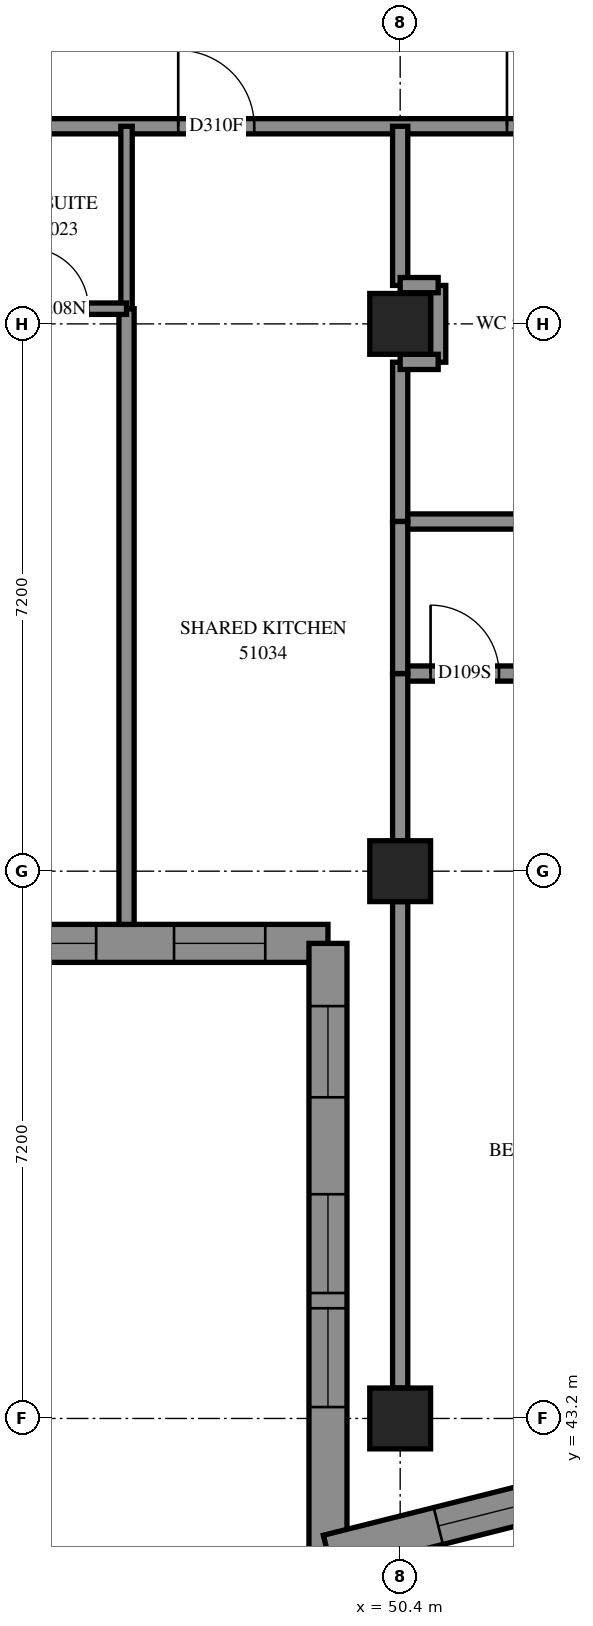
"""IFC4 building model, lengths in metres.
Left out: names, types, materials, properties, quantities, classifications, styles, units other than length and angle.
Written with IfcOpenShell. Run it as: python <this file> out.ifc"""

import sys

from ifc_helpers import new_model, si_unit, direction, frame, frame_2d, origin, origin_2d, place, context, subcontext, project, spatial, polyline, rectangle, outline, extrude, element, fill, save


model = new_model("IFC4")
c1 = context("Model", 3, precision=1e-05, world=origin(), true_north=direction((0.0, 1.0)))
c2 = subcontext(c1, "Body", "Model", "MODEL_VIEW")
j1 = project(units=[si_unit("LENGTHUNIT", "METRE"), si_unit("PLANEANGLEUNIT", "RADIAN")], contexts=[c1])
p1 = place(None, origin())
s1 = spatial("IfcSite", under=j1, at=p1, CompositionType="ELEMENT")
p2 = place(p1, origin())
s2 = spatial("IfcBuilding", under=s1, at=p2, CompositionType="ELEMENT")
p3 = place(p2, frame((0.0, 0.0, 189.6)))
s3 = spatial("IfcBuildingStorey", under=s2, at=p3, CompositionType="ELEMENT", Elevation=189.6)
for number, where, z_axis, x_axis in (
    (1, (50.4, 43.2, 0.0), (0.0, 0.0, 1.0), (1.0, 0.0, 0.0)),
    (2, (50.4, 50.4, 0.0), (0.0, 0.0, 1.0), (1.0, 0.0, 0.0)),
    (3, (50.4, 57.6, 0.0), (0.0, 0.0, 1.0), (1.0, 0.0, 0.0)),
):
    element("IfcColumn", number, at=place(p3, frame(where, z_axis=z_axis, x_axis=x_axis)), inside=s3, PredefinedType="COLUMN", context=c2, shape_type="SweptSolid", body=[
        extrude(rectangle(XDim=0.8, YDim=0.8, at=origin_2d()), origin(), (0.0, 0.0, 1.0), 3.1),
    ])
p4 = place(p3, frame((42.25, 49.45, 0.0), z_axis=(0.0, 0.0, 1.0), x_axis=(1.0, 0.0, 0.0)))
e4 = element("IfcWall", 4, at=p4, inside=s3, PredefinedType="SOLIDWALL", context=c2, shape_type="SweptSolid", body=[
    extrude(outline(polyline([(-0.25, -0.25), (6.95, -0.25), (7.45, 0.25), (0.25, 0.25), (-0.25, -0.25)])), origin(), (0.0, 0.0, 1.0), 3.1),
])
p5 = place(p4, frame((1.35, 0.0, 0.45)))
e5 = element("IfcOpeningElement", 5, at=p5, cuts=e4, PredefinedType="OPENING", context=c2, shape_type="SweptSolid", body=[
    extrude(rectangle(XDim=1.3, YDim=2.5, at=frame_2d((0.65, 1.25))), frame((0.0, 0.26, 0.0), z_axis=(0.0, -1.0, 0.0), x_axis=(1.0, 0.0, 0.0)), (0.0, 0.0, 1.0), 0.52),
])
p6 = place(p4, frame((2.85, 0.0, 0.45)))
e6 = element("IfcOpeningElement", 6, at=p6, cuts=e4, PredefinedType="OPENING", context=c2, shape_type="SweptSolid", body=[
    extrude(rectangle(XDim=1.3, YDim=2.5, at=frame_2d((0.65, 1.25))), frame((0.0, 0.26, 0.0), z_axis=(0.0, -1.0, 0.0), x_axis=(1.0, 0.0, 0.0)), (0.0, 0.0, 1.0), 0.52),
])
p7 = place(p4, frame((5.175, 0.0, 0.45)))
e7 = element("IfcOpeningElement", 7, at=p7, cuts=e4, PredefinedType="OPENING", context=c2, shape_type="SweptSolid", body=[
    extrude(rectangle(XDim=1.2, YDim=2.5, at=frame_2d((0.6, 1.25))), frame((0.0, 0.26, 0.0), z_axis=(0.0, -1.0, 0.0), x_axis=(1.0, 0.0, 0.0)), (0.0, 0.0, 1.0), 0.52),
])
p8 = place(p3, frame((49.45, 49.45, 0.0), z_axis=(0.0, 0.0, 1.0), x_axis=(0.0, -1.0, 0.0)))
e8 = element("IfcWall", 8, at=p8, inside=s3, PredefinedType="SOLIDWALL", context=c2, shape_type="SweptSolid", body=[
    extrude(outline(polyline([(0.25, -0.25), (8.35, -0.25), (7.709, 0.25), (-0.25, 0.25), (0.25, -0.25)])), origin(), (0.0, 0.0, 1.0), 3.1),
])
p9 = place(p8, frame((3.3, 0.0, 0.45)))
e9 = element("IfcOpeningElement", 9, at=p9, cuts=e8, PredefinedType="OPENING", context=c2, shape_type="SweptSolid", body=[
    extrude(rectangle(XDim=1.3, YDim=2.5, at=frame_2d((0.65, 1.25))), frame((0.0, 0.26, 0.0), z_axis=(0.0, -1.0, 0.0), x_axis=(1.0, 0.0, 0.0)), (0.0, 0.0, 1.0), 0.52),
])
p10 = place(p8, frame((4.8, 0.0, 0.45)))
e10 = element("IfcOpeningElement", 10, at=p10, cuts=e8, PredefinedType="OPENING", context=c2, shape_type="SweptSolid", body=[
    extrude(rectangle(XDim=1.3, YDim=2.5, at=frame_2d((0.65, 1.25))), frame((0.0, 0.26, 0.0), z_axis=(0.0, -1.0, 0.0), x_axis=(1.0, 0.0, 0.0)), (0.0, 0.0, 1.0), 0.52),
])
p11 = place(p8, frame((0.825, 0.0, 0.45)))
e11 = element("IfcOpeningElement", 11, at=p11, cuts=e8, PredefinedType="OPENING", context=c2, shape_type="SweptSolid", body=[
    extrude(rectangle(XDim=1.2, YDim=2.5, at=frame_2d((0.6, 1.25))), frame((0.0, 0.26, 0.0), z_axis=(0.0, -1.0, 0.0), x_axis=(1.0, 0.0, 0.0)), (0.0, 0.0, 1.0), 0.52),
])
p12 = place(p3, frame((49.45, 41.421, 0.0), z_axis=(0.0, 0.0, 1.0), x_axis=(0.9698558331, 0.2436794266, 0.0)))
e12 = element("IfcWall", 12, at=p12, inside=s3, PredefinedType="SOLIDWALL", context=c2, shape_type="SweptSolid", body=[
    extrude(outline(polyline([(-0.321, -0.25), (3.373, -0.25), (3.456, 0.25), (0.321, 0.25), (-0.321, -0.25)])), origin(), (0.0, 0.0, 1.0), 3.1),
])
p13 = place(p12, frame((1.497, 0.0, 0.45)))
e13 = element("IfcOpeningElement", 13, at=p13, cuts=e12, PredefinedType="OPENING", context=c2, shape_type="SweptSolid", body=[
    extrude(rectangle(XDim=1.2, YDim=2.5, at=frame_2d((0.6, 1.25))), frame((0.0, 0.26, 0.0), z_axis=(0.0, -1.0, 0.0), x_axis=(1.0, 0.0, 0.0)), (0.0, 0.0, 1.0), 0.52),
])
p14 = place(p3, frame((36.0, 60.2, 0.0), z_axis=(0.0, 0.0, 1.0), x_axis=(1.0, 0.0, 0.0)))
e14 = element("IfcWall", 14, at=p14, inside=s3, PredefinedType="PARTITIONING", context=c2, shape_type="SweptSolid", body=[
    extrude(rectangle(XDim=17.0, YDim=0.2, at=frame_2d((8.5, 0.0))), origin(), (0.0, 0.0, 1.0), 3.1),
])
p15 = place(p14, frame((4.125, 0.0, 0.0)))
e15 = element("IfcOpeningElement", 15, at=p15, cuts=e14, PredefinedType="OPENING", context=c2, shape_type="SweptSolid", body=[
    extrude(rectangle(XDim=1.0, YDim=2.1, at=frame_2d((0.5, 1.05))), frame((0.0, 0.11, 0.0), z_axis=(0.0, -1.0, 0.0), x_axis=(1.0, 0.0, 0.0)), (0.0, 0.0, 1.0), 0.22),
])
p16 = place(p14, frame((7.6, 0.0, 0.0)))
e16 = element("IfcOpeningElement", 16, at=p16, cuts=e14, PredefinedType="OPENING", context=c2, shape_type="SweptSolid", body=[
    extrude(rectangle(XDim=0.9, YDim=2.1, at=frame_2d((0.45, 1.05))), frame((0.0, 0.11, 0.0), z_axis=(0.0, -1.0, 0.0), x_axis=(1.0, 0.0, 0.0)), (0.0, 0.0, 1.0), 0.22),
])
p17 = place(p14, frame((11.48, 0.0, 0.0)))
e17 = element("IfcOpeningElement", 17, at=p17, cuts=e14, PredefinedType="OPENING", context=c2, shape_type="SweptSolid", body=[
    extrude(rectangle(XDim=1.0, YDim=2.1, at=frame_2d((0.5, 1.05))), frame((0.0, 0.11, 0.0), z_axis=(0.0, -1.0, 0.0), x_axis=(1.0, 0.0, 0.0)), (0.0, 0.0, 1.0), 0.22),
])
p18 = place(p14, frame((15.805, 0.0, 0.0)))
e18 = element("IfcOpeningElement", 18, at=p18, cuts=e14, PredefinedType="OPENING", context=c2, shape_type="SweptSolid", body=[
    extrude(rectangle(XDim=1.0, YDim=2.1, at=frame_2d((0.5, 1.05))), frame((0.0, 0.11, 0.0), z_axis=(0.0, -1.0, 0.0), x_axis=(1.0, 0.0, 0.0)), (0.0, 0.0, 1.0), 0.22),
])
p19 = place(p3, frame((46.8, 49.7, 0.0), z_axis=(0.0, 0.0, 1.0), x_axis=(0.0, 1.0, 0.0)))
e19 = element("IfcWall", 19, at=p19, inside=s3, PredefinedType="PARTITIONING", context=c2, shape_type="SweptSolid", body=[
    extrude(rectangle(XDim=8.1, YDim=0.2, at=frame_2d((4.05, 0.0))), origin(), (0.0, 0.0, 1.0), 3.1),
])
p20 = place(p3, frame((50.4, 43.6, 0.0), z_axis=(0.0, 0.0, 1.0), x_axis=(0.0, 1.0, 0.0)))
e20 = element("IfcWall", 20, at=p20, inside=s3, PredefinedType="PARTITIONING", context=c2, shape_type="SweptSolid", body=[
    extrude(rectangle(XDim=6.4, YDim=0.2, at=frame_2d((3.2, 0.0))), origin(), (0.0, 0.0, 1.0), 2.6),
])
p21 = place(p3, frame((50.4, 53.0, 0.0), z_axis=(0.0, 0.0, 1.0), x_axis=(1.0, 0.0, 0.0)))
e21 = element("IfcWall", 21, at=p21, inside=s3, PredefinedType="PARTITIONING", context=c2, shape_type="SweptSolid", body=[
    extrude(rectangle(XDim=5.2, YDim=0.2, at=frame_2d((2.6, 0.0))), origin(), (0.0, 0.0, 1.0), 3.1),
])
p22 = place(p21, frame((0.4, 0.0, 0.0)))
e22 = element("IfcOpeningElement", 22, at=p22, cuts=e21, PredefinedType="OPENING", context=c2, shape_type="SweptSolid", body=[
    extrude(rectangle(XDim=0.9, YDim=2.1, at=frame_2d((0.45, 1.05))), frame((0.0, 0.11, 0.0), z_axis=(0.0, -1.0, 0.0), x_axis=(1.0, 0.0, 0.0)), (0.0, 0.0, 1.0), 0.22),
])
p23 = place(p21, frame((3.946, 0.0, 0.0)))
e23 = element("IfcOpeningElement", 23, at=p23, cuts=e21, PredefinedType="OPENING", context=c2, shape_type="SweptSolid", body=[
    extrude(rectangle(XDim=1.0, YDim=2.1, at=frame_2d((0.5, 1.05))), frame((0.0, 0.11, 0.0), z_axis=(0.0, -1.0, 0.0), x_axis=(1.0, 0.0, 0.0)), (0.0, 0.0, 1.0), 0.22),
])
p24 = place(p3, frame((50.4, 55.0, 0.0), z_axis=(0.0, 0.0, 1.0), x_axis=(1.0, 0.0, 0.0)))
e24 = element("IfcWall", 24, at=p24, inside=s3, PredefinedType="PARTITIONING", context=c2, shape_type="SweptSolid", body=[
    extrude(rectangle(XDim=2.6, YDim=0.2, at=frame_2d((1.3, 0.0))), origin(), (0.0, 0.0, 1.0), 3.1),
])
p25 = place(p3, frame((46.8, 57.8, 0.0), z_axis=(0.0, 0.0, 1.0), x_axis=(0.0, 1.0, 0.0)))
e25 = element("IfcWall", 25, at=p25, inside=s3, PredefinedType="PARTITIONING", context=c2, shape_type="SweptSolid", body=[
    extrude(rectangle(XDim=2.4, YDim=0.15, at=frame_2d((1.2, 0.0))), origin(), (0.0, 0.0, 1.0), 3.1),
])
p26 = place(p3, frame((50.4, 50.8, 0.0), z_axis=(0.0, 0.0, 1.0), x_axis=(0.0, 1.0, 0.0)))
e26 = element("IfcWall", 26, at=p26, inside=s3, PredefinedType="PARTITIONING", context=c2, shape_type="SweptSolid", body=[
    extrude(rectangle(XDim=2.2, YDim=0.2, at=frame_2d((1.1, 0.0))), origin(), (0.0, 0.0, 1.0), 3.1),
])
p27 = place(p3, frame((50.4, 55.0, 0.0), z_axis=(0.0, 0.0, 1.0), x_axis=(0.0, 1.0, 0.0)))
e27 = element("IfcWall", 27, at=p27, inside=s3, PredefinedType="PARTITIONING", context=c2, shape_type="SweptSolid", body=[
    extrude(rectangle(XDim=2.096, YDim=0.2, at=frame_2d((1.048, 0.0))), origin(), (0.0, 0.0, 1.0), 3.1),
])
p28 = place(p3, frame((50.4, 58.106, 0.0), z_axis=(0.0, 0.0, 1.0), x_axis=(0.0, 1.0, 0.0)))
e28 = element("IfcWall", 28, at=p28, inside=s3, PredefinedType="PARTITIONING", context=c2, shape_type="SweptSolid", body=[
    extrude(rectangle(XDim=2.094, YDim=0.2, at=frame_2d((1.047, 0.0))), origin(), (0.0, 0.0, 1.0), 3.1),
])
p29 = place(p3, frame((50.4, 53.0, 0.0), z_axis=(0.0, 0.0, 1.0), x_axis=(0.0, 1.0, 0.0)))
e29 = element("IfcWall", 29, at=p29, inside=s3, PredefinedType="PARTITIONING", context=c2, shape_type="SweptSolid", body=[
    extrude(rectangle(XDim=2.0, YDim=0.2, at=frame_2d((1.0, 0.0))), origin(), (0.0, 0.0, 1.0), 3.1),
])
p30 = place(p3, frame((44.9, 57.8, 0.0), z_axis=(0.0, 0.0, 1.0), x_axis=(1.0, 0.0, 0.0)))
e30 = element("IfcWall", 30, at=p30, inside=s3, PredefinedType="PARTITIONING", context=c2, shape_type="SweptSolid", body=[
    extrude(rectangle(XDim=1.9, YDim=0.15, at=frame_2d((0.95, 0.0))), origin(), (0.0, 0.0, 1.0), 3.1),
])
p31 = place(p30, frame((0.598, 0.0, 0.0)))
e31 = element("IfcOpeningElement", 31, at=p31, cuts=e30, PredefinedType="OPENING", context=c2, shape_type="SweptSolid", body=[
    extrude(rectangle(XDim=0.8, YDim=2.1, at=frame_2d((0.4, 1.05))), frame((0.0, 0.085, 0.0), z_axis=(0.0, -1.0, 0.0), x_axis=(1.0, 0.0, 0.0)), (0.0, 0.0, 1.0), 0.17),
])
p32 = place(p3, frame((50.9, 57.096, 0.0), z_axis=(0.0, 0.0, 1.0), x_axis=(0.0, 1.0, 0.0)))
e32 = element("IfcWall", 32, at=p32, inside=s3, PredefinedType="PARTITIONING", context=c2, shape_type="SweptSolid", body=[
    extrude(rectangle(XDim=1.01, YDim=0.2, at=frame_2d((0.505, 0.0))), origin(), (0.0, 0.0, 1.0), 3.1),
])
for number, where, z_axis, x_axis in (
    (33, (50.4, 58.11, 0.0), (0.0, 0.0, 1.0), (1.0, 0.0, 0.0)),
    (34, (50.4, 57.1, 0.0), (0.0, 0.0, 1.0), (1.0, 0.0, 0.0)),
):
    element("IfcWall", number, at=place(p3, frame(where, z_axis=z_axis, x_axis=x_axis)), inside=s3, PredefinedType="PARTITIONING", context=c2, shape_type="SweptSolid", body=[
        extrude(rectangle(XDim=0.5, YDim=0.2, at=frame_2d((0.25, 0.0))), origin(), (0.0, 0.0, 1.0), 3.1),
    ])
p33 = place(p6, origin())
e35 = element("IfcWindow", 35, at=p33, inside=s3, PartitioningType="SINGLE_PANEL", PredefinedType="WINDOW", context=c2, shape_type="SweptSolid", body=[
    extrude(rectangle(XDim=1.3, YDim=2.5, at=frame_2d((0.65, 1.25))), frame((0.0, 0.18, 0.0), z_axis=(0.0, -1.0, 0.0), x_axis=(1.0, 0.0, 0.0)), (0.0, 0.0, 1.0), 0.06),
])
fill(e6, e35)
p34 = place(p7, origin())
e36 = element("IfcWindow", 36, at=p34, inside=s3, PartitioningType="SINGLE_PANEL", PredefinedType="WINDOW", context=c2, shape_type="SweptSolid", body=[
    extrude(rectangle(XDim=1.2, YDim=2.5, at=frame_2d((0.6, 1.25))), frame((0.0, 0.18, 0.0), z_axis=(0.0, -1.0, 0.0), x_axis=(1.0, 0.0, 0.0)), (0.0, 0.0, 1.0), 0.06),
])
fill(e7, e36)
p35 = place(p9, origin())
e37 = element("IfcWindow", 37, at=p35, inside=s3, PartitioningType="SINGLE_PANEL", PredefinedType="WINDOW", context=c2, shape_type="SweptSolid", body=[
    extrude(rectangle(XDim=1.3, YDim=2.5, at=frame_2d((0.65, 1.25))), frame((0.0, 0.18, 0.0), z_axis=(0.0, -1.0, 0.0), x_axis=(1.0, 0.0, 0.0)), (0.0, 0.0, 1.0), 0.06),
])
fill(e9, e37)
p36 = place(p10, origin())
e38 = element("IfcWindow", 38, at=p36, inside=s3, PartitioningType="SINGLE_PANEL", PredefinedType="WINDOW", context=c2, shape_type="SweptSolid", body=[
    extrude(rectangle(XDim=1.3, YDim=2.5, at=frame_2d((0.65, 1.25))), frame((0.0, 0.18, 0.0), z_axis=(0.0, -1.0, 0.0), x_axis=(1.0, 0.0, 0.0)), (0.0, 0.0, 1.0), 0.06),
])
fill(e10, e38)
p37 = place(p11, origin())
e39 = element("IfcWindow", 39, at=p37, inside=s3, PartitioningType="SINGLE_PANEL", PredefinedType="WINDOW", context=c2, shape_type="SweptSolid", body=[
    extrude(rectangle(XDim=1.2, YDim=2.5, at=frame_2d((0.6, 1.25))), frame((0.0, 0.18, 0.0), z_axis=(0.0, -1.0, 0.0), x_axis=(1.0, 0.0, 0.0)), (0.0, 0.0, 1.0), 0.06),
])
fill(e11, e39)
p38 = place(p13, origin())
e40 = element("IfcWindow", 40, at=p38, inside=s3, PartitioningType="SINGLE_PANEL", PredefinedType="WINDOW", context=c2, shape_type="SweptSolid", body=[
    extrude(rectangle(XDim=1.2, YDim=2.5, at=frame_2d((0.6, 1.25))), frame((0.0, 0.18, 0.0), z_axis=(0.0, -1.0, 0.0), x_axis=(1.0, 0.0, 0.0)), (0.0, 0.0, 1.0), 0.06),
])
fill(e13, e40)
p39 = place(p31, origin())
e41 = element("IfcDoor", 41, at=p39, inside=s3, OperationType="SINGLE_SWING_RIGHT", PredefinedType="DOOR", context=c2, shape_type="SweptSolid", body=[
    extrude(rectangle(XDim=0.8, YDim=2.1, at=frame_2d((0.4, 1.05))), frame((0.0, 0.025, 0.0), z_axis=(0.0, -1.0, 0.0), x_axis=(1.0, 0.0, 0.0)), (0.0, 0.0, 1.0), 0.05),
])
fill(e31, e41)
p40 = place(p17, origin())
e42 = element("IfcDoor", 42, at=p40, inside=s3, OperationType="SINGLE_SWING_RIGHT", PredefinedType="DOOR", context=c2, shape_type="SweptSolid", body=[
    extrude(rectangle(XDim=1.0, YDim=2.1, at=frame_2d((0.5, 1.05))), frame((0.0, 0.025, 0.0), z_axis=(0.0, -1.0, 0.0), x_axis=(1.0, 0.0, 0.0)), (0.0, 0.0, 1.0), 0.05),
])
fill(e17, e42)
p41 = place(p18, origin())
e43 = element("IfcDoor", 43, at=p41, inside=s3, OperationType="SINGLE_SWING_LEFT", PredefinedType="DOOR", context=c2, shape_type="SweptSolid", body=[
    extrude(rectangle(XDim=1.0, YDim=2.1, at=frame_2d((0.5, 1.05))), frame((0.0, 0.025, 0.0), z_axis=(0.0, -1.0, 0.0), x_axis=(1.0, 0.0, 0.0)), (0.0, 0.0, 1.0), 0.05),
])
fill(e18, e43)
p42 = place(p22, origin())
e44 = element("IfcDoor", 44, at=p42, inside=s3, OperationType="SINGLE_SWING_LEFT", PredefinedType="DOOR", context=c2, shape_type="SweptSolid", body=[
    extrude(rectangle(XDim=0.9, YDim=2.1, at=frame_2d((0.45, 1.05))), frame((0.0, 0.025, 0.0), z_axis=(0.0, -1.0, 0.0), x_axis=(1.0, 0.0, 0.0)), (0.0, 0.0, 1.0), 0.05),
])
fill(e22, e44)
save(model, sys.argv[1])
